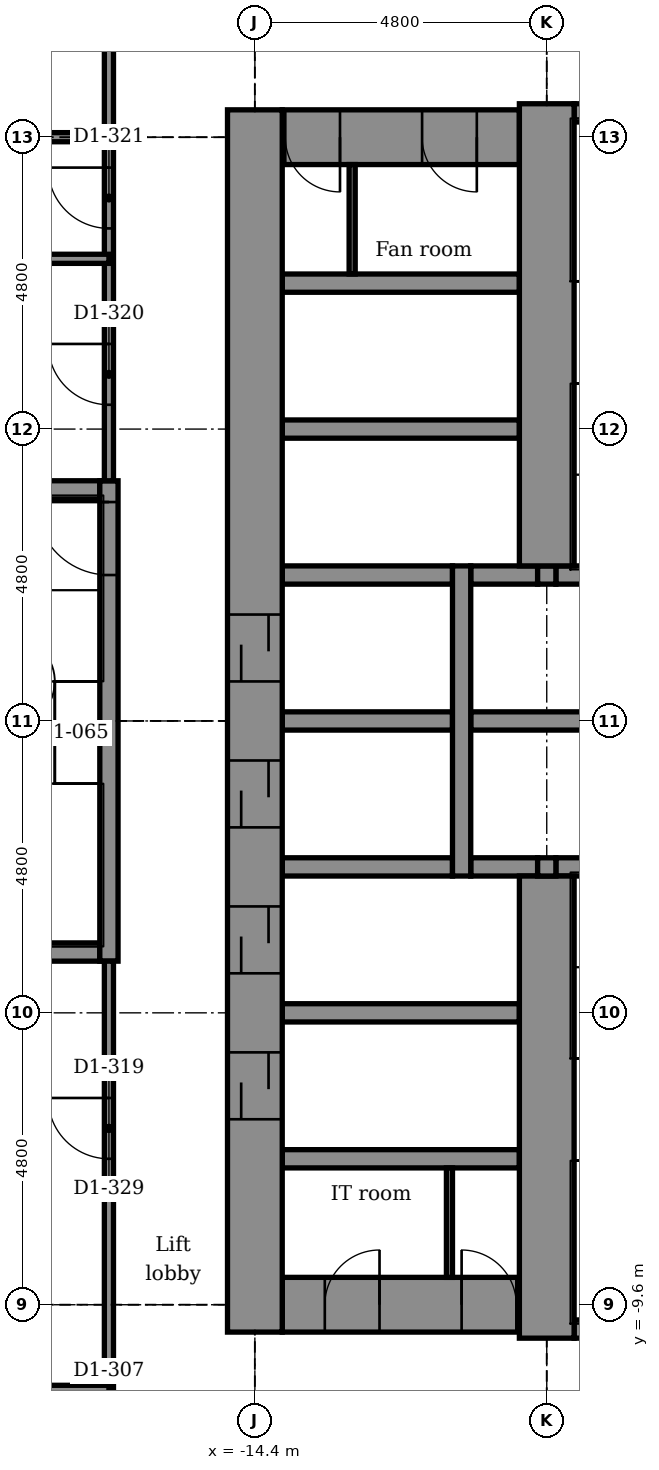
"""IFC4 building model, lengths in metres.
Left out: names, types, materials, properties, quantities, classifications, styles, units other than length and angle.
Written with IfcOpenShell. Run it as: python <this file> out.ifc"""

import sys

from ifc_helpers import new_model, si_unit, direction, frame, frame_2d, origin, place, context, subcontext, project, spatial, rectangle, extrude, element, fill, save


model = new_model("IFC4")
c1 = context("Model", 3, precision=1e-05, world=origin(), true_north=direction((0.0, 1.0)))
c2 = subcontext(c1, "Body", "Model", "MODEL_VIEW")
j1 = project(units=[si_unit("LENGTHUNIT", "METRE"), si_unit("PLANEANGLEUNIT", "RADIAN")], contexts=[c1])
p1 = place(None, origin())
s1 = spatial("IfcSite", under=j1, at=p1, CompositionType="ELEMENT")
p2 = place(p1, origin())
s2 = spatial("IfcBuilding", under=s1, at=p2, CompositionType="ELEMENT")
p3 = place(p2, frame((0.0, 0.0, 113.9)))
s3 = spatial("IfcBuildingStorey", under=s2, at=p3, CompositionType="ELEMENT", Elevation=113.9)
p4 = place(p3, frame((-9.15, -10.0, -0.2), z_axis=(0.0, 0.0, 1.0), x_axis=(1.0, 0.0, 0.0)))
e1 = element("IfcWall", 1, at=p4, inside=s3, PredefinedType="STANDARD", context=c2, shape_type="SweptSolid", body=[
    extrude(rectangle(XDim=3.9, YDim=0.3, at=frame_2d((1.95, 0.0))), origin(), (0.0, 0.0, 1.0), 4.5),
])
p5 = place(p3, frame((-13.95, -9.6, -0.2), z_axis=(0.0, 0.0, 1.0), x_axis=(1.0, 0.0, 0.0)))
e2 = element("IfcWall", 2, at=p5, inside=s3, PredefinedType="SHEAR", context=c2, shape_type="SweptSolid", body=[
    extrude(rectangle(XDim=3.9, YDim=0.9, at=frame_2d((1.95, 0.0))), origin(), (0.0, 0.0, 1.0), 4.5),
])
p6 = place(p5, frame((0.7, 0.0, 0.2)))
e3 = element("IfcOpeningElement", 3, at=p6, cuts=e2, PredefinedType="OPENING", context=c2, shape_type="SweptSolid", body=[
    extrude(rectangle(XDim=0.9, YDim=2.1, at=frame_2d((0.45, 1.05))), frame((0.0, 0.46, 0.0), z_axis=(0.0, -1.0, 0.0), x_axis=(1.0, 0.0, 0.0)), (0.0, 0.0, 1.0), 0.92),
])
p7 = place(p5, frame((2.95, 0.0, 0.2)))
e4 = element("IfcOpeningElement", 4, at=p7, cuts=e2, PredefinedType="OPENING", context=c2, shape_type="SweptSolid", body=[
    extrude(rectangle(XDim=0.9, YDim=2.1, at=frame_2d((0.45, 1.05))), frame((0.0, 0.46, 0.0), z_axis=(0.0, -1.0, 0.0), x_axis=(1.0, 0.0, 0.0)), (0.0, 0.0, 1.0), 0.92),
])
for number, where, z_axis, x_axis in (
    (5, (-13.95, -7.2, -0.2), (0.0, 0.0, 1.0), (1.0, 0.0, 0.0)),
    (6, (-13.95, -4.8, -0.2), (0.0, 0.0, 1.0), (1.0, 0.0, 0.0)),
):
    element("IfcWall", number, at=place(p3, frame(where, z_axis=z_axis, x_axis=x_axis)), inside=s3, PredefinedType="STANDARD", context=c2, shape_type="SweptSolid", body=[
        extrude(rectangle(XDim=3.9, YDim=0.3, at=frame_2d((1.95, 0.0))), origin(), (0.0, 0.0, 1.0), 4.5),
    ])
p8 = place(p3, frame((-21.45, -3.8, -0.2), z_axis=(0.0, 0.0, 1.0), x_axis=(1.0, 0.0, 0.0)))
e7 = element("IfcWall", 7, at=p8, inside=s3, PredefinedType="STANDARD", context=c2, shape_type="SweptSolid", body=[
    extrude(rectangle(XDim=4.5, YDim=0.3, at=frame_2d((2.25, 0.0))), origin(), (0.0, 0.0, 1.0), 4.5),
])
p9 = place(p3, frame((-13.95, -2.4, -0.2), z_axis=(0.0, 0.0, 1.0), x_axis=(1.0, 0.0, 0.0)))
e8 = element("IfcWall", 8, at=p9, inside=s3, PredefinedType="STANDARD", context=c2, shape_type="SweptSolid", body=[
    extrude(rectangle(XDim=2.8, YDim=0.3, at=frame_2d((1.4, 0.0))), origin(), (0.0, 0.0, 1.0), 4.5),
])
p10 = place(p3, frame((-10.85, -2.4, -0.2), z_axis=(0.0, 0.0, 1.0), x_axis=(1.0, 0.0, 0.0)))
e9 = element("IfcWall", 9, at=p10, inside=s3, PredefinedType="STANDARD", context=c2, shape_type="SweptSolid", body=[
    extrude(rectangle(XDim=1.1, YDim=0.3, at=frame_2d((0.55, 0.0))), origin(), (0.0, 0.0, 1.0), 4.5),
])
p11 = place(p3, frame((-9.45, -2.4, -0.2), z_axis=(0.0, 0.0, 1.0), x_axis=(1.0, 0.0, 0.0)))
e10 = element("IfcWall", 10, at=p11, inside=s3, PredefinedType="STANDARD", context=c2, shape_type="SweptSolid", body=[
    extrude(rectangle(XDim=1.9, YDim=0.3, at=frame_2d((0.95, 0.0))), origin(), (0.0, 0.0, 1.0), 4.5),
])
p12 = place(p3, frame((-13.95, 0.0, -0.2), z_axis=(0.0, 0.0, 1.0), x_axis=(1.0, 0.0, 0.0)))
e11 = element("IfcWall", 11, at=p12, inside=s3, PredefinedType="STANDARD", context=c2, shape_type="SweptSolid", body=[
    extrude(rectangle(XDim=2.8, YDim=0.3, at=frame_2d((1.4, 0.0))), origin(), (0.0, 0.0, 1.0), 4.5),
])
p13 = place(p3, frame((-10.85, 0.0, -0.2), z_axis=(0.0, 0.0, 1.0), x_axis=(1.0, 0.0, 0.0)))
e12 = element("IfcWall", 12, at=p13, inside=s3, PredefinedType="STANDARD", context=c2, shape_type="SweptSolid", body=[
    extrude(rectangle(XDim=3.3, YDim=0.3, at=frame_2d((1.65, 0.0))), origin(), (0.0, 0.0, 1.0), 4.5),
])
p14 = place(p3, frame((-13.95, 2.4, -0.2), z_axis=(0.0, 0.0, 1.0), x_axis=(1.0, 0.0, 0.0)))
e13 = element("IfcWall", 13, at=p14, inside=s3, PredefinedType="STANDARD", context=c2, shape_type="SweptSolid", body=[
    extrude(rectangle(XDim=2.8, YDim=0.3, at=frame_2d((1.4, 0.0))), origin(), (0.0, 0.0, 1.0), 4.5),
])
p15 = place(p3, frame((-10.85, 2.4, -0.2), z_axis=(0.0, 0.0, 1.0), x_axis=(1.0, 0.0, 0.0)))
e14 = element("IfcWall", 14, at=p15, inside=s3, PredefinedType="STANDARD", context=c2, shape_type="SweptSolid", body=[
    extrude(rectangle(XDim=1.1, YDim=0.3, at=frame_2d((0.55, 0.0))), origin(), (0.0, 0.0, 1.0), 4.5),
])
p16 = place(p3, frame((-9.45, 2.4, -0.2), z_axis=(0.0, 0.0, 1.0), x_axis=(1.0, 0.0, 0.0)))
e15 = element("IfcWall", 15, at=p16, inside=s3, PredefinedType="STANDARD", context=c2, shape_type="SweptSolid", body=[
    extrude(rectangle(XDim=1.9, YDim=0.3, at=frame_2d((0.95, 0.0))), origin(), (0.0, 0.0, 1.0), 4.5),
])
p17 = place(p3, frame((-21.45, 3.8, -0.2), z_axis=(0.0, 0.0, 1.0), x_axis=(1.0, 0.0, 0.0)))
e16 = element("IfcWall", 16, at=p17, inside=s3, PredefinedType="STANDARD", context=c2, shape_type="SweptSolid", body=[
    extrude(rectangle(XDim=4.5, YDim=0.3, at=frame_2d((2.25, 0.0))), origin(), (0.0, 0.0, 1.0), 4.5),
])
for number, where, z_axis, x_axis in (
    (17, (-13.95, 4.8, -0.2), (0.0, 0.0, 1.0), (1.0, 0.0, 0.0)),
    (18, (-13.95, 7.2, -0.2), (0.0, 0.0, 1.0), (1.0, 0.0, 0.0)),
):
    element("IfcWall", number, at=place(p3, frame(where, z_axis=z_axis, x_axis=x_axis)), inside=s3, PredefinedType="STANDARD", context=c2, shape_type="SweptSolid", body=[
        extrude(rectangle(XDim=3.9, YDim=0.3, at=frame_2d((1.95, 0.0))), origin(), (0.0, 0.0, 1.0), 4.5),
    ])
p18 = place(p3, frame((-13.95, 9.6, -0.2), z_axis=(0.0, 0.0, 1.0), x_axis=(1.0, 0.0, 0.0)))
e19 = element("IfcWall", 19, at=p18, inside=s3, PredefinedType="SHEAR", context=c2, shape_type="SweptSolid", body=[
    extrude(rectangle(XDim=3.9, YDim=0.9, at=frame_2d((1.95, 0.0))), origin(), (0.0, 0.0, 1.0), 4.5),
])
p19 = place(p18, frame((0.05, 0.0, 0.2)))
e20 = element("IfcOpeningElement", 20, at=p19, cuts=e19, PredefinedType="OPENING", context=c2, shape_type="SweptSolid", body=[
    extrude(rectangle(XDim=0.9, YDim=2.1, at=frame_2d((0.45, 1.05))), frame((0.0, 0.46, 0.0), z_axis=(0.0, -1.0, 0.0), x_axis=(1.0, 0.0, 0.0)), (0.0, 0.0, 1.0), 0.92),
])
p20 = place(p18, frame((2.3, 0.0, 0.2)))
e21 = element("IfcOpeningElement", 21, at=p20, cuts=e19, PredefinedType="OPENING", context=c2, shape_type="SweptSolid", body=[
    extrude(rectangle(XDim=0.9, YDim=2.1, at=frame_2d((0.45, 1.05))), frame((0.0, 0.46, 0.0), z_axis=(0.0, -1.0, 0.0), x_axis=(1.0, 0.0, 0.0)), (0.0, 0.0, 1.0), 0.92),
])
p21 = place(p3, frame((-9.15, 10.0, -0.2), z_axis=(0.0, 0.0, 1.0), x_axis=(1.0, 0.0, 0.0)))
e22 = element("IfcWall", 22, at=p21, inside=s3, PredefinedType="STANDARD", context=c2, shape_type="SweptSolid", body=[
    extrude(rectangle(XDim=3.9, YDim=0.3, at=frame_2d((1.95, 0.0))), origin(), (0.0, 0.0, 1.0), 4.5),
])
p22 = place(p3, frame((-16.8, -3.95, -0.2), z_axis=(0.0, 0.0, 1.0), x_axis=(0.0, 1.0, 0.0)))
e23 = element("IfcWall", 23, at=p22, inside=s3, PredefinedType="STANDARD", context=c2, shape_type="SweptSolid", body=[
    extrude(rectangle(XDim=7.9, YDim=0.3, at=frame_2d((3.95, 0.0))), origin(), (0.0, 0.0, 1.0), 4.5),
])
p23 = place(p22, frame((6.35, 0.0, 0.2)))
e24 = element("IfcOpeningElement", 24, at=p23, cuts=e23, PredefinedType="OPENING", context=c2, shape_type="SweptSolid", body=[
    extrude(rectangle(XDim=1.2, YDim=2.1, at=frame_2d((0.6, 1.05))), frame((0.0, 0.16, 0.0), z_axis=(0.0, -1.0, 0.0), x_axis=(1.0, 0.0, 0.0)), (0.0, 0.0, 1.0), 0.32),
])
p24 = place(p3, frame((-14.4, -10.05, -0.2), z_axis=(0.0, 0.0, 1.0), x_axis=(0.0, 1.0, 0.0)))
e25 = element("IfcWall", 25, at=p24, inside=s3, PredefinedType="SHEAR", context=c2, shape_type="SweptSolid", body=[
    extrude(rectangle(XDim=20.1, YDim=0.9, at=frame_2d((10.05, 0.0))), origin(), (0.0, 0.0, 1.0), 4.5),
])
p25 = place(p24, frame((3.5, 0.0, 0.2)))
e26 = element("IfcOpeningElement", 26, at=p25, cuts=e25, PredefinedType="OPENING", context=c2, shape_type="SweptSolid", body=[
    extrude(rectangle(XDim=1.1, YDim=2.1, at=frame_2d((0.55, 1.05))), frame((0.0, 0.46, 0.0), z_axis=(0.0, -1.0, 0.0), x_axis=(1.0, 0.0, 0.0)), (0.0, 0.0, 1.0), 0.92),
])
p26 = place(p24, frame((5.9, 0.0, 0.2)))
e27 = element("IfcOpeningElement", 27, at=p26, cuts=e25, PredefinedType="OPENING", context=c2, shape_type="SweptSolid", body=[
    extrude(rectangle(XDim=1.1, YDim=2.1, at=frame_2d((0.55, 1.05))), frame((0.0, 0.46, 0.0), z_axis=(0.0, -1.0, 0.0), x_axis=(1.0, 0.0, 0.0)), (0.0, 0.0, 1.0), 0.92),
])
p27 = place(p24, frame((8.3, 0.0, 0.2)))
e28 = element("IfcOpeningElement", 28, at=p27, cuts=e25, PredefinedType="OPENING", context=c2, shape_type="SweptSolid", body=[
    extrude(rectangle(XDim=1.1, YDim=2.1, at=frame_2d((0.55, 1.05))), frame((0.0, 0.46, 0.0), z_axis=(0.0, -1.0, 0.0), x_axis=(1.0, 0.0, 0.0)), (0.0, 0.0, 1.0), 0.92),
])
p28 = place(p24, frame((10.7, 0.0, 0.2)))
e29 = element("IfcOpeningElement", 29, at=p28, cuts=e25, PredefinedType="OPENING", context=c2, shape_type="SweptSolid", body=[
    extrude(rectangle(XDim=1.1, YDim=2.1, at=frame_2d((0.55, 1.05))), frame((0.0, 0.46, 0.0), z_axis=(0.0, -1.0, 0.0), x_axis=(1.0, 0.0, 0.0)), (0.0, 0.0, 1.0), 0.92),
])
p29 = place(p3, frame((-11.0, -2.55, -0.2), z_axis=(0.0, 0.0, 1.0), x_axis=(0.0, 1.0, 0.0)))
e30 = element("IfcWall", 30, at=p29, inside=s3, PredefinedType="STANDARD", context=c2, shape_type="SweptSolid", body=[
    extrude(rectangle(XDim=5.1, YDim=0.3, at=frame_2d((2.55, 0.0))), origin(), (0.0, 0.0, 1.0), 4.5),
])
p30 = place(p3, frame((-9.6, -10.15, -0.2), z_axis=(0.0, 0.0, 1.0), x_axis=(0.0, 1.0, 0.0)))
e31 = element("IfcWall", 31, at=p30, inside=s3, PredefinedType="SHEAR", context=c2, shape_type="SweptSolid", body=[
    extrude(rectangle(XDim=7.6, YDim=0.9, at=frame_2d((3.8, 0.0))), origin(), (0.0, 0.0, 1.0), 4.5),
])
for number, where, z_axis, x_axis in (
    (32, (-9.6, -2.55, -0.2), (0.0, 0.0, 1.0), (0.0, 1.0, 0.0)),
    (33, (-9.6, 2.25, -0.2), (0.0, 0.0, 1.0), (0.0, 1.0, 0.0)),
):
    element("IfcWall", number, at=place(p3, frame(where, z_axis=z_axis, x_axis=x_axis)), inside=s3, PredefinedType="STANDARD", context=c2, shape_type="SweptSolid", body=[
        extrude(rectangle(XDim=0.3, YDim=0.3, at=frame_2d((0.15, 0.0))), origin(), (0.0, 0.0, 1.0), 4.5),
    ])
p31 = place(p3, frame((-9.6, 2.55, -0.2), z_axis=(0.0, 0.0, 1.0), x_axis=(0.0, 1.0, 0.0)))
e34 = element("IfcWall", 34, at=p31, inside=s3, PredefinedType="SHEAR", context=c2, shape_type="SweptSolid", body=[
    extrude(rectangle(XDim=7.6, YDim=0.9, at=frame_2d((3.8, 0.0))), origin(), (0.0, 0.0, 1.0), 4.5),
])
for number, where, z_axis, x_axis in (
    (35, (-11.2, -9.15, 0.0), (0.0, 0.0, 1.0), (0.0, 1.0, 0.0)),
    (36, (-12.8, 7.35, 0.0), (0.0, 0.0, 1.0), (0.0, 1.0, 0.0)),
):
    element("IfcWall", number, at=place(p3, frame(where, z_axis=z_axis, x_axis=x_axis)), inside=s3, PredefinedType="PARTITIONING", context=c2, shape_type="SweptSolid", body=[
        extrude(rectangle(XDim=1.8, YDim=0.1, at=frame_2d((0.9, 0.0))), origin(), (0.0, 0.0, 1.0), 4.3),
    ])
p32 = place(p3, frame((-16.8, -12.4, 0.0), z_axis=(0.0, 0.0, 1.0), x_axis=(0.0, 1.0, 0.0)))
e37 = element("IfcWall", 37, at=p32, inside=s3, PredefinedType="PARTITIONING", context=c2, shape_type="SweptSolid", body=[
    extrude(rectangle(XDim=8.45, YDim=0.15, at=frame_2d((4.225, 0.0))), origin(), (0.0, 0.0, 1.0), 4.3),
])
p33 = place(p32, frame((0.215, 0.0, 0.0)))
e38 = element("IfcOpeningElement", 38, at=p33, cuts=e37, PredefinedType="OPENING", context=c2, shape_type="SweptSolid", body=[
    extrude(rectangle(XDim=1.0, YDim=2.1, at=frame_2d((0.5, 1.05))), frame((0.0, 0.085, 0.0), z_axis=(0.0, -1.0, 0.0), x_axis=(1.0, 0.0, 0.0)), (0.0, 0.0, 1.0), 0.17),
])
p34 = place(p32, frame((5.2, 0.0, 0.0)))
e39 = element("IfcOpeningElement", 39, at=p34, cuts=e37, PredefinedType="OPENING", context=c2, shape_type="SweptSolid", body=[
    extrude(rectangle(XDim=1.0, YDim=2.1, at=frame_2d((0.5, 1.05))), frame((0.0, 0.085, 0.0), z_axis=(0.0, -1.0, 0.0), x_axis=(1.0, 0.0, 0.0)), (0.0, 0.0, 1.0), 0.17),
])
p35 = place(p3, frame((-16.8, 3.95, 0.0), z_axis=(0.0, 0.0, 1.0), x_axis=(0.0, 1.0, 0.0)))
e40 = element("IfcWall", 40, at=p35, inside=s3, PredefinedType="PARTITIONING", context=c2, shape_type="SweptSolid", body=[
    extrude(rectangle(XDim=21.908, YDim=0.15, at=frame_2d((10.954, 0.0))), origin(), (0.0, 0.0, 1.0), 4.3),
])
p36 = place(p35, frame((1.25, 0.0, 0.0)))
e41 = element("IfcOpeningElement", 41, at=p36, cuts=e40, PredefinedType="OPENING", context=c2, shape_type="SweptSolid", body=[
    extrude(rectangle(XDim=1.0, YDim=2.1, at=frame_2d((0.5, 1.05))), frame((0.0, 0.085, 0.0), z_axis=(0.0, -1.0, 0.0), x_axis=(1.0, 0.0, 0.0)), (0.0, 0.0, 1.0), 0.17),
])
p37 = place(p35, frame((4.15, 0.0, 0.0)))
e42 = element("IfcOpeningElement", 42, at=p37, cuts=e40, PredefinedType="OPENING", context=c2, shape_type="SweptSolid", body=[
    extrude(rectangle(XDim=1.0, YDim=2.1, at=frame_2d((0.5, 1.05))), frame((0.0, 0.085, 0.0), z_axis=(0.0, -1.0, 0.0), x_axis=(1.0, 0.0, 0.0)), (0.0, 0.0, 1.0), 0.17),
])
p38 = place(p35, frame((7.35, 0.0, 0.0)))
e43 = element("IfcOpeningElement", 43, at=p38, cuts=e40, PredefinedType="OPENING", context=c2, shape_type="SweptSolid", body=[
    extrude(rectangle(XDim=1.0, YDim=2.1, at=frame_2d((0.5, 1.05))), frame((0.0, 0.085, 0.0), z_axis=(0.0, -1.0, 0.0), x_axis=(1.0, 0.0, 0.0)), (0.0, 0.0, 1.0), 0.17),
])
p39 = place(p3, frame((-25.378, -11.0, 0.0), z_axis=(0.0, 0.0, 1.0), x_axis=(1.0, 0.0, 0.0)))
e44 = element("IfcWall", 44, at=p39, inside=s3, PredefinedType="PARTITIONING", context=c2, shape_type="SweptSolid", body=[
    extrude(rectangle(XDim=8.578, YDim=0.15, at=frame_2d((4.289, 0.0))), origin(), (0.0, 0.0, 1.0), 4.3),
])
p40 = place(p3, frame((-27.342, 7.6, 0.0), z_axis=(0.0, 0.0, 1.0), x_axis=(1.0, 0.0, 0.0)))
e45 = element("IfcWall", 45, at=p40, inside=s3, PredefinedType="PARTITIONING", context=c2, shape_type="SweptSolid", body=[
    extrude(rectangle(XDim=10.542, YDim=0.15, at=frame_2d((5.271, 0.0))), origin(), (0.0, 0.0, 1.0), 4.3),
])
p41 = place(p3, frame((-18.7, 9.6, 0.0), z_axis=(0.0, 0.0, 1.0), x_axis=(1.0, 0.0, 0.0)))
e46 = element("IfcWall", 46, at=p41, inside=s3, PredefinedType="PARTITIONING", context=c2, shape_type="SweptSolid", body=[
    extrude(rectangle(XDim=1.9, YDim=0.15, at=frame_2d((0.95, 0.0))), origin(), (0.0, 0.0, 1.0), 3.692),
])
p42 = place(p34, origin())
e47 = element("IfcDoor", 47, at=p42, inside=s3, OperationType="SINGLE_SWING_RIGHT", PredefinedType="DOOR", context=c2, shape_type="SweptSolid", body=[
    extrude(rectangle(XDim=1.0, YDim=2.1, at=frame_2d((0.5, 1.05))), frame((0.0, 0.025, 0.0), z_axis=(0.0, -1.0, 0.0), x_axis=(1.0, 0.0, 0.0)), (0.0, 0.0, 1.0), 0.05),
])
fill(e39, e47)
p43 = place(p36, origin())
e48 = element("IfcDoor", 48, at=p43, inside=s3, OperationType="SINGLE_SWING_RIGHT", PredefinedType="DOOR", context=c2, shape_type="SweptSolid", body=[
    extrude(rectangle(XDim=1.0, YDim=2.1, at=frame_2d((0.5, 1.05))), frame((0.0, 0.025, 0.0), z_axis=(0.0, -1.0, 0.0), x_axis=(1.0, 0.0, 0.0)), (0.0, 0.0, 1.0), 0.05),
])
fill(e41, e48)
p44 = place(p37, origin())
e49 = element("IfcDoor", 49, at=p44, inside=s3, OperationType="SINGLE_SWING_RIGHT", PredefinedType="DOOR", context=c2, shape_type="SweptSolid", body=[
    extrude(rectangle(XDim=1.0, YDim=2.1, at=frame_2d((0.5, 1.05))), frame((0.0, 0.025, 0.0), z_axis=(0.0, -1.0, 0.0), x_axis=(1.0, 0.0, 0.0)), (0.0, 0.0, 1.0), 0.05),
])
fill(e42, e49)
p45 = place(p25, origin())
e50 = element("IfcDoor", 50, at=p45, inside=s3, OperationType="DOUBLE_DOOR_SLIDING", PredefinedType="DOOR", context=c2, shape_type="SweptSolid", body=[
    extrude(rectangle(XDim=1.1, YDim=2.1, at=frame_2d((0.55, 1.05))), frame((0.0, 0.025, 0.0), z_axis=(0.0, -1.0, 0.0), x_axis=(1.0, 0.0, 0.0)), (0.0, 0.0, 1.0), 0.05),
])
fill(e26, e50)
p46 = place(p26, origin())
e51 = element("IfcDoor", 51, at=p46, inside=s3, OperationType="DOUBLE_DOOR_SLIDING", PredefinedType="DOOR", context=c2, shape_type="SweptSolid", body=[
    extrude(rectangle(XDim=1.1, YDim=2.1, at=frame_2d((0.55, 1.05))), frame((0.0, 0.025, 0.0), z_axis=(0.0, -1.0, 0.0), x_axis=(1.0, 0.0, 0.0)), (0.0, 0.0, 1.0), 0.05),
])
fill(e27, e51)
p47 = place(p27, origin())
e52 = element("IfcDoor", 52, at=p47, inside=s3, OperationType="DOUBLE_DOOR_SLIDING", PredefinedType="DOOR", context=c2, shape_type="SweptSolid", body=[
    extrude(rectangle(XDim=1.1, YDim=2.1, at=frame_2d((0.55, 1.05))), frame((0.0, 0.025, 0.0), z_axis=(0.0, -1.0, 0.0), x_axis=(1.0, 0.0, 0.0)), (0.0, 0.0, 1.0), 0.05),
])
fill(e28, e52)
p48 = place(p28, origin())
e53 = element("IfcDoor", 53, at=p48, inside=s3, OperationType="DOUBLE_DOOR_SLIDING", PredefinedType="DOOR", context=c2, shape_type="SweptSolid", body=[
    extrude(rectangle(XDim=1.1, YDim=2.1, at=frame_2d((0.55, 1.05))), frame((0.0, 0.025, 0.0), z_axis=(0.0, -1.0, 0.0), x_axis=(1.0, 0.0, 0.0)), (0.0, 0.0, 1.0), 0.05),
])
fill(e29, e53)
p49 = place(p23, origin())
e54 = element("IfcDoor", 54, at=p49, inside=s3, OperationType="SINGLE_SWING_RIGHT", PredefinedType="DOOR", context=c2, shape_type="SweptSolid", body=[
    extrude(rectangle(XDim=1.2, YDim=2.1, at=frame_2d((0.6, 1.05))), frame((0.0, 0.025, 0.0), z_axis=(0.0, -1.0, 0.0), x_axis=(1.0, 0.0, 0.0)), (0.0, 0.0, 1.0), 0.05),
])
fill(e24, e54)
p50 = place(p6, origin())
e55 = element("IfcDoor", 55, at=p50, inside=s3, OperationType="SINGLE_SWING_RIGHT", PredefinedType="DOOR", context=c2, shape_type="SweptSolid", body=[
    extrude(rectangle(XDim=0.9, YDim=2.1, at=frame_2d((0.45, 1.05))), frame((0.0, 0.025, 0.0), z_axis=(0.0, -1.0, 0.0), x_axis=(1.0, 0.0, 0.0)), (0.0, 0.0, 1.0), 0.05),
])
fill(e3, e55)
p51 = place(p7, origin())
e56 = element("IfcDoor", 56, at=p51, inside=s3, OperationType="SINGLE_SWING_LEFT", PredefinedType="DOOR", context=c2, shape_type="SweptSolid", body=[
    extrude(rectangle(XDim=0.9, YDim=2.1, at=frame_2d((0.45, 1.05))), frame((0.0, 0.025, 0.0), z_axis=(0.0, -1.0, 0.0), x_axis=(1.0, 0.0, 0.0)), (0.0, 0.0, 1.0), 0.05),
])
fill(e4, e56)
p52 = place(p19, frame((0.9, 0.0, 0.0), z_axis=(0.0, 0.0, 1.0), x_axis=(-1.0, 0.0, 0.0)))
e57 = element("IfcDoor", 57, at=p52, inside=s3, OperationType="SINGLE_SWING_RIGHT", PredefinedType="DOOR", context=c2, shape_type="SweptSolid", body=[
    extrude(rectangle(XDim=0.9, YDim=2.1, at=frame_2d((0.45, 1.05))), frame((0.0, 0.025, 0.0), z_axis=(0.0, -1.0, 0.0), x_axis=(1.0, 0.0, 0.0)), (0.0, 0.0, 1.0), 0.05),
])
fill(e20, e57)
p53 = place(p20, frame((0.9, 0.0, 0.0), z_axis=(0.0, 0.0, 1.0), x_axis=(-1.0, 0.0, 0.0)))
e58 = element("IfcDoor", 58, at=p53, inside=s3, OperationType="SINGLE_SWING_RIGHT", PredefinedType="DOOR", context=c2, shape_type="SweptSolid", body=[
    extrude(rectangle(XDim=0.9, YDim=2.1, at=frame_2d((0.45, 1.05))), frame((0.0, 0.025, 0.0), z_axis=(0.0, -1.0, 0.0), x_axis=(1.0, 0.0, 0.0)), (0.0, 0.0, 1.0), 0.05),
])
fill(e21, e58)
save(model, sys.argv[1])
